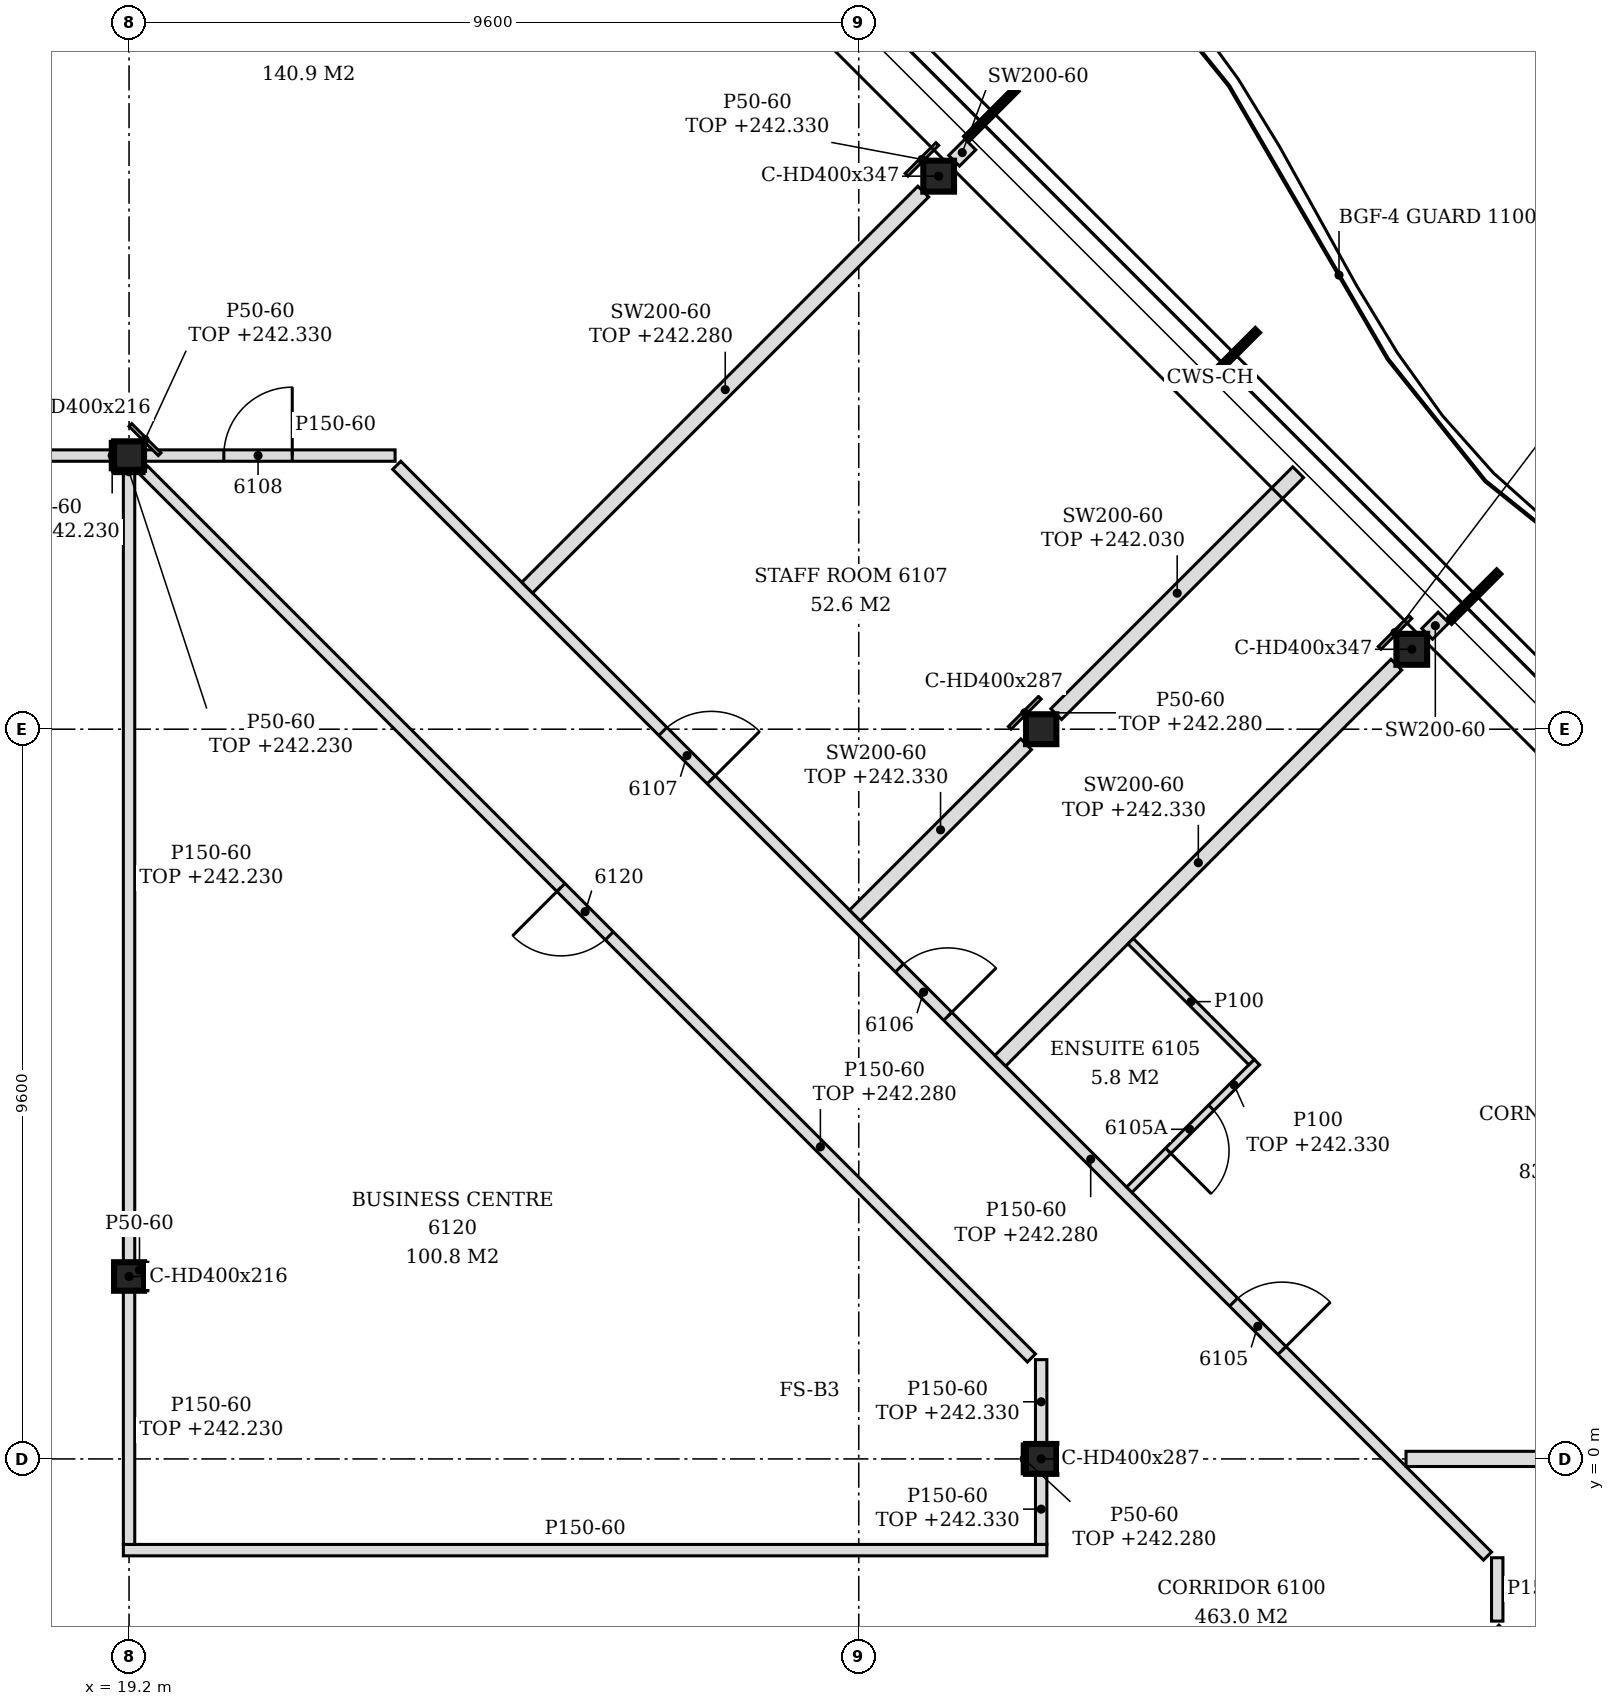
"""IFC4 building model, lengths in metres.
Left out: names, types, materials, properties, quantities, classifications, styles, units other than length and angle.
Written with IfcOpenShell. Run it as: python <this file> out.ifc"""

import sys

from ifc_helpers import new_model, si_unit, direction, frame, frame_2d, origin, origin_2d, place, context, subcontext, project, spatial, polyline, rectangle, i_section, outline, extrude, element, fill, save


model = new_model("IFC4")
c1 = context("Model", 3, precision=1e-05, world=origin(), true_north=direction((0.0, 1.0)))
c2 = subcontext(c1, "Body", "Model", "MODEL_VIEW")
j1 = project(units=[si_unit("LENGTHUNIT", "METRE"), si_unit("PLANEANGLEUNIT", "RADIAN")], contexts=[c1])
p1 = place(None, origin())
s1 = spatial("IfcSite", under=j1, at=p1, CompositionType="ELEMENT")
p2 = place(p1, origin())
s2 = spatial("IfcBuilding", under=s1, at=p2, CompositionType="ELEMENT")
p3 = place(p2, frame((0.0, 0.0, 239.4)))
s3 = spatial("IfcBuildingStorey", under=s2, at=p3, CompositionType="ELEMENT", Elevation=239.4)
for number, where, z_axis, x_axis in (
    (1, (36.076, 10.652, -0.15), (0.0, 0.0, 1.0), (1.0, 0.0, 0.0)),
    (2, (29.852, 16.876, -0.15), (0.0, 0.0, 1.0), (1.0, 0.0, 0.0)),
):
    element("IfcColumn", number, at=place(p3, frame(where, z_axis=z_axis, x_axis=x_axis)), inside=s3, PredefinedType="COLUMN", context=c2, shape_type="SweptSolid", body=[
        extrude(i_section(OverallWidth=0.404, OverallDepth=0.407, WebThickness=0.027, FlangeThickness=0.044, FilletRadius=0.015, at=origin_2d()), origin(), (0.0, 0.0, 1.0), 3.6),
    ])
for number, where, z_axis, x_axis in (
    (3, (19.2, 2.4, -0.15), (0.0, 0.0, 1.0), (1.0, 0.0, 0.0)),
    (4, (19.2, 13.2, -0.15), (0.0, 0.0, 1.0), (1.0, 0.0, 0.0)),
):
    element("IfcColumn", number, at=place(p3, frame(where, z_axis=z_axis, x_axis=x_axis)), inside=s3, PredefinedType="COLUMN", context=c2, shape_type="SweptSolid", body=[
        extrude(i_section(OverallWidth=0.394, OverallDepth=0.375, WebThickness=0.017, FlangeThickness=0.028, FilletRadius=0.015, at=origin_2d()), origin(), (0.0, 0.0, 1.0), 3.6),
    ])
for number, where, z_axis, x_axis in (
    (5, (31.2, 0.0, -0.15), (0.0, 0.0, 1.0), (1.0, 0.0, 0.0)),
    (6, (31.2, 9.6, -0.15), (0.0, 0.0, 1.0), (1.0, 0.0, 0.0)),
):
    element("IfcColumn", number, at=place(p3, frame(where, z_axis=z_axis, x_axis=x_axis)), inside=s3, PredefinedType="COLUMN", context=c2, shape_type="SweptSolid", body=[
        extrude(i_section(OverallWidth=0.399, OverallDepth=0.393, WebThickness=0.023, FlangeThickness=0.037, FilletRadius=0.015, at=origin_2d()), origin(), (0.0, 0.0, 1.0), 3.6),
    ])
p4 = place(p3, frame((35.503, -4.012, 0.0), z_axis=(0.0, 0.0, 1.0), x_axis=(0.707106781187, 0.707106781187, 0.0)))
e7 = element("IfcWall", 7, at=p4, inside=s3, PredefinedType="PARTITIONING", context=c2, shape_type="SweptSolid", body=[
    extrude(rectangle(XDim=2.506, YDim=0.15, at=frame_2d((1.253, 0.0))), origin(), (0.0, 0.0, 1.0), 3.45),
])
p5 = place(p3, frame((37.2, -2.134, 0.0), z_axis=(0.0, 0.0, 1.0), x_axis=(0.0, 1.0, 0.0)))
e8 = element("IfcWall", 8, at=p5, inside=s3, PredefinedType="PARTITIONING", context=c2, shape_type="SweptSolid", body=[
    extrude(rectangle(XDim=0.834, YDim=0.15, at=frame_2d((0.417, 0.0))), origin(), (0.0, 0.0, 1.0), 3.45),
])
p6 = place(p3, frame((37.072, -1.278, 0.0), z_axis=(0.0, 0.0, 1.0), x_axis=(-0.707106781187, 0.707106781187, 0.0)))
e9 = element("IfcWall", 9, at=p6, inside=s3, PredefinedType="PARTITIONING", context=c2, shape_type="SweptSolid", body=[
    extrude(rectangle(XDim=20.294, YDim=0.15, at=frame_2d((10.147, 0.0))), origin(), (0.0, 0.0, 1.0), 2.88),
])
p7 = place(p6, frame((3.824, 0.0, 0.0)))
e10 = element("IfcOpeningElement", 10, at=p7, cuts=e9, PredefinedType="OPENING", context=c2, shape_type="SweptSolid", body=[
    extrude(rectangle(XDim=0.9, YDim=2.1, at=frame_2d((0.45, 1.05))), frame((0.0, 0.085, 0.0), z_axis=(0.0, -1.0, 0.0), x_axis=(1.0, 0.0, 0.0)), (0.0, 0.0, 1.0), 0.17),
])
p8 = place(p6, frame((10.042, 0.0, 0.0)))
e11 = element("IfcOpeningElement", 11, at=p8, cuts=e9, PredefinedType="OPENING", context=c2, shape_type="SweptSolid", body=[
    extrude(rectangle(XDim=0.9, YDim=2.1, at=frame_2d((0.45, 1.05))), frame((0.0, 0.085, 0.0), z_axis=(0.0, -1.0, 0.0), x_axis=(1.0, 0.0, 0.0)), (0.0, 0.0, 1.0), 0.17),
])
p9 = place(p6, frame((14.443, 0.0, 0.0)))
e12 = element("IfcOpeningElement", 12, at=p9, cuts=e9, PredefinedType="OPENING", context=c2, shape_type="SweptSolid", body=[
    extrude(rectangle(XDim=0.9, YDim=2.1, at=frame_2d((0.45, 1.05))), frame((0.0, 0.085, 0.0), z_axis=(0.0, -1.0, 0.0), x_axis=(1.0, 0.0, 0.0)), (0.0, 0.0, 1.0), 0.17),
])
p10 = place(p3, frame((19.125, -1.2, 0.0), z_axis=(0.0, 0.0, 1.0), x_axis=(1.0, 0.0, 0.0)))
e13 = element("IfcWall", 13, at=p10, inside=s3, PredefinedType="PARTITIONING", context=c2, shape_type="SweptSolid", body=[
    extrude(outline(polyline([(0.0, 0.0), (12.15, 0.0), (12.15, 2.93), (11.925, 2.93), (11.923, 3.45), (0.225, 3.45), (0.223, 2.83), (0.0, 2.83), (0.0, 0.0)])), frame((0.0, 0.075, 0.0), z_axis=(0.0, -1.0, 0.0), x_axis=(1.0, 0.0, 0.0)), (0.0, 0.0, 1.0), 0.15),
])
p11 = place(p3, frame((19.2, -1.125, 0.0), z_axis=(0.0, 0.0, 1.0), x_axis=(0.0, 1.0, 0.0)))
e14 = element("IfcWall", 14, at=p11, inside=s3, PredefinedType="PARTITIONING", context=c2, shape_type="SweptSolid", body=[
    extrude(rectangle(XDim=3.337, YDim=0.15, at=frame_2d((1.669, 0.0))), origin(), (0.0, 0.0, 1.0), 2.83),
])
p12 = place(p3, frame((31.2, -1.125, 0.0), z_axis=(0.0, 0.0, 1.0), x_axis=(0.0, 1.0, 0.0)))
e15 = element("IfcWall", 15, at=p12, inside=s3, PredefinedType="PARTITIONING", context=c2, shape_type="SweptSolid", body=[
    extrude(rectangle(XDim=0.928, YDim=0.15, at=frame_2d((0.464, 0.0))), origin(), (0.0, 0.0, 1.0), 2.93),
])
p13 = place(p3, frame((36.0, 0.0, 0.0), z_axis=(0.0, 0.0, 1.0), x_axis=(1.0, 0.0, 0.0)))
e16 = element("IfcWall", 16, at=p13, inside=s3, PredefinedType="PARTITIONING", context=c2, shape_type="SweptSolid", body=[
    extrude(rectangle(XDim=6.85, YDim=0.2, at=frame_2d((3.425, 0.0))), origin(), (0.0, 0.0, 1.0), 2.88),
])
p14 = place(p3, frame((31.2, 0.197, 0.0), z_axis=(0.0, 0.0, 1.0), x_axis=(0.0, 1.0, 0.0)))
e17 = element("IfcWall", 17, at=p14, inside=s3, PredefinedType="PARTITIONING", context=c2, shape_type="SweptSolid", body=[
    extrude(rectangle(XDim=1.11, YDim=0.15, at=frame_2d((0.555, 0.0))), origin(), (0.0, 0.0, 1.0), 2.93),
])
p15 = place(p3, frame((31.072, 1.328, 0.0), z_axis=(0.0, 0.0, 1.0), x_axis=(-0.707099390895, 0.707114171401, 0.0)))
e18 = element("IfcWall", 18, at=p15, inside=s3, PredefinedType="PARTITIONING", context=c2, shape_type="SweptSolid", body=[
    extrude(rectangle(XDim=16.518, YDim=0.15, at=frame_2d((8.259, 0.0))), origin(), (0.0, 0.0, 1.0), 2.88),
])
p16 = place(p15, frame((7.854, 0.0, 0.0)))
e19 = element("IfcOpeningElement", 19, at=p16, cuts=e18, PredefinedType="OPENING", context=c2, shape_type="SweptSolid", body=[
    extrude(rectangle(XDim=0.9, YDim=2.1, at=frame_2d((0.45, 1.05))), frame((0.0, 0.085, 0.0), z_axis=(0.0, -1.0, 0.0), x_axis=(1.0, 0.0, 0.0)), (0.0, 0.0, 1.0), 0.17),
])
p17 = place(p3, frame((19.2, 2.587, 0.0), z_axis=(0.0, 0.0, 1.0), x_axis=(0.0, 1.0, 0.0)))
e20 = element("IfcWall", 20, at=p17, inside=s3, PredefinedType="PARTITIONING", context=c2, shape_type="SweptSolid", body=[
    extrude(rectangle(XDim=10.425, YDim=0.15, at=frame_2d((5.212, 0.0))), origin(), (0.0, 0.0, 1.0), 2.83),
])
p18 = place(p3, frame((32.359, 3.541, 0.0), z_axis=(0.0, 0.0, 1.0), x_axis=(0.707158179099, 0.707055379538, 0.0)))
e21 = element("IfcWall", 21, at=p18, inside=s3, PredefinedType="PARTITIONING", context=c2, shape_type="SweptSolid", body=[
    extrude(rectangle(XDim=2.375, YDim=0.1, at=frame_2d((1.188, 0.0))), origin(), (0.0, 0.0, 1.0), 2.93),
])
p19 = place(p18, frame((0.725, 0.0, 0.0)))
e22 = element("IfcOpeningElement", 22, at=p19, cuts=e21, PredefinedType="OPENING", context=c2, shape_type="SweptSolid", body=[
    extrude(rectangle(XDim=0.8, YDim=2.1, at=frame_2d((0.4, 1.05))), frame((0.0, 0.06, 0.0), z_axis=(0.0, -1.0, 0.0), x_axis=(1.0, 0.0, 0.0)), (0.0, 0.0, 1.0), 0.12),
])
p20 = place(p3, frame((30.662, 5.238, 0.0), z_axis=(0.0, 0.0, 1.0), x_axis=(0.707106781187, 0.707106781187, 0.0)))
e23 = element("IfcWall", 23, at=p20, inside=s3, PredefinedType="PARTITIONING", context=c2, shape_type="SweptSolid", body=[
    extrude(rectangle(XDim=7.369, YDim=0.2, at=frame_2d((3.685, 0.0))), origin(), (0.0, 0.0, 1.0), 2.93),
])
p21 = place(p3, frame((33.968, 5.22, 0.0), z_axis=(0.0, 0.0, 1.0), x_axis=(-0.707106781187, 0.707106781187, 0.0)))
e24 = element("IfcWall", 24, at=p21, inside=s3, PredefinedType="PARTITIONING", context=c2, shape_type="SweptSolid", body=[
    extrude(rectangle(XDim=2.25, YDim=0.1, at=frame_2d((1.125, 0.0))), origin(), (0.0, 0.0, 1.0), 3.45),
])
p22 = place(p3, frame((28.75, 7.15, 0.0), z_axis=(0.0, 0.0, 1.0), x_axis=(0.7070684525, 0.707145107796, 0.0)))
e25 = element("IfcWall", 25, at=p22, inside=s3, PredefinedType="PARTITIONING", context=c2, shape_type="SweptSolid", body=[
    extrude(rectangle(XDim=3.185, YDim=0.2, at=frame_2d((1.592, 0.0))), origin(), (0.0, 0.0, 1.0), 2.93),
])
p23 = place(p3, frame((31.398, 9.798, 0.0), z_axis=(0.0, 0.0, 1.0), x_axis=(0.707133900936, 0.707079660397, 0.0)))
e26 = element("IfcWall", 26, at=p23, inside=s3, PredefinedType="PARTITIONING", context=c2, shape_type="SweptSolid", body=[
    extrude(rectangle(XDim=4.501, YDim=0.2, at=frame_2d((2.25, 0.0))), origin(), (0.0, 0.0, 1.0), 2.63),
])
p24 = place(p3, frame((36.278, 10.854, 0.0), z_axis=(0.0, 0.0, 1.0), x_axis=(0.707509117806, 0.706704215511, 0.0)))
e27 = element("IfcWall", 27, at=p24, inside=s3, PredefinedType="PARTITIONING", context=c2, shape_type="SweptSolid", body=[
    extrude(rectangle(XDim=0.303, YDim=0.2, at=frame_2d((0.152, 0.0))), origin(), (0.0, 0.0, 1.0), 3.45),
])
p25 = place(p3, frame((24.438, 11.462, 0.0), z_axis=(0.0, 0.0, 1.0), x_axis=(0.707090216072, 0.707123345913, 0.0)))
e28 = element("IfcWall", 28, at=p25, inside=s3, PredefinedType="PARTITIONING", context=c2, shape_type="SweptSolid", body=[
    extrude(rectangle(XDim=7.369, YDim=0.2, at=frame_2d((3.685, 0.0))), origin(), (0.0, 0.0, 1.0), 2.88),
])
p26 = place(p3, frame((7.397, 13.2, 0.0), z_axis=(0.0, 0.0, 1.0), x_axis=(1.0, 0.0, 0.0)))
e29 = element("IfcWall", 29, at=p26, inside=s3, PredefinedType="PARTITIONING", context=c2, shape_type="SweptSolid", body=[
    extrude(rectangle(XDim=11.606, YDim=0.15, at=frame_2d((5.803, 0.0))), origin(), (0.0, 0.0, 1.0), 2.83),
])
p27 = place(p26, frame((3.227, 0.0, 0.0)))
e30 = element("IfcOpeningElement", 30, at=p27, cuts=e29, PredefinedType="OPENING", context=c2, shape_type="SweptSolid", body=[
    extrude(rectangle(XDim=1.8, YDim=2.1, at=frame_2d((0.9, 1.05))), frame((0.0, 0.085, 0.0), z_axis=(0.0, -1.0, 0.0), x_axis=(1.0, 0.0, 0.0)), (0.0, 0.0, 1.0), 0.17),
])
p28 = place(p3, frame((19.397, 13.2, 0.0), z_axis=(0.0, 0.0, 1.0), x_axis=(1.0, 0.0, 0.0)))
e31 = element("IfcWall", 31, at=p28, inside=s3, PredefinedType="PARTITIONING", context=c2, shape_type="SweptSolid", body=[
    extrude(rectangle(XDim=3.303, YDim=0.15, at=frame_2d((1.652, 0.0))), origin(), (0.0, 0.0, 1.0), 3.45),
])
p29 = place(p28, frame((1.05, 0.0, 0.0)))
e32 = element("IfcOpeningElement", 32, at=p29, cuts=e31, PredefinedType="OPENING", context=c2, shape_type="SweptSolid", body=[
    extrude(rectangle(XDim=0.9, YDim=2.1, at=frame_2d((0.45, 1.05))), frame((0.0, 0.085, 0.0), z_axis=(0.0, -1.0, 0.0), x_axis=(1.0, 0.0, 0.0)), (0.0, 0.0, 1.0), 0.17),
])
p30 = place(p3, frame((30.054, 17.078, 0.0), z_axis=(0.0, 0.0, 1.0), x_axis=(0.707106781187, 0.707106781187, 0.0)))
e33 = element("IfcWall", 33, at=p30, inside=s3, PredefinedType="PARTITIONING", context=c2, shape_type="SweptSolid", body=[
    extrude(rectangle(XDim=0.303, YDim=0.2, at=frame_2d((0.152, 0.0))), origin(), (0.0, 0.0, 1.0), 3.45),
])
p31 = place(p3, frame((19.422, 2.212, 0.0), z_axis=(0.0, 0.0, 1.0), x_axis=(0.0, 1.0, 0.0)))
e34 = element("IfcWall", 34, at=p31, inside=s3, PredefinedType="PARTITIONING", context=c2, shape_type="SweptSolid", body=[
    extrude(rectangle(XDim=0.375, YDim=0.05, at=frame_2d((0.188, 0.0))), origin(), (0.0, 0.0, 1.0), 3.45),
])
p32 = place(p3, frame((18.978, 13.012, 0.0), z_axis=(0.0, 0.0, 1.0), x_axis=(0.0, 1.0, 0.0)))
e35 = element("IfcWall", 35, at=p32, inside=s3, PredefinedType="PARTITIONING", context=c2, shape_type="SweptSolid", body=[
    extrude(rectangle(XDim=0.375, YDim=0.05, at=frame_2d((0.188, 0.0))), origin(), (0.0, 0.0, 1.0), 2.83),
])
p33 = place(p3, frame((30.976, -0.197, 0.0), z_axis=(0.0, 0.0, 1.0), x_axis=(0.0, 1.0, 0.0)))
e36 = element("IfcWall", 36, at=p33, inside=s3, PredefinedType="PARTITIONING", context=c2, shape_type="SweptSolid", body=[
    extrude(rectangle(XDim=0.393, YDim=0.05, at=frame_2d((0.197, 0.0))), origin(), (0.0, 0.0, 1.0), 2.88),
])
p34 = place(p3, frame((19.602, 13.218, 0.0), z_axis=(0.0, 0.0, 1.0), x_axis=(-0.707106781187, 0.707106781187, 0.0)))
e37 = element("IfcWall", 37, at=p34, inside=s3, PredefinedType="PARTITIONING", context=c2, shape_type="SweptSolid", body=[
    extrude(rectangle(XDim=0.544, YDim=0.05, at=frame_2d((0.272, 0.0))), origin(), (0.0, 0.0, 1.0), 2.93),
])
p35 = place(p3, frame((35.653, 10.669, 0.0), z_axis=(0.0, 0.0, 1.0), x_axis=(0.707106781187, 0.707106781187, 0.0)))
e38 = element("IfcWall", 38, at=p35, inside=s3, PredefinedType="PARTITIONING", context=c2, shape_type="SweptSolid", body=[
    extrude(rectangle(XDim=0.573, YDim=0.05, at=frame_2d((0.287, 0.0))), origin(), (0.0, 0.0, 1.0), 2.63),
])
p36 = place(p3, frame((30.786, 9.618, 0.0), z_axis=(0.0, 0.0, 1.0), x_axis=(0.707106781187, 0.707106781187, 0.0)))
e39 = element("IfcWall", 39, at=p36, inside=s3, PredefinedType="PARTITIONING", context=c2, shape_type="SweptSolid", body=[
    extrude(rectangle(XDim=0.56, YDim=0.05, at=frame_2d((0.28, 0.0))), origin(), (0.0, 0.0, 1.0), 2.88),
])
p37 = place(p3, frame((29.428, 16.893, 0.0), z_axis=(0.0, 0.0, 1.0), x_axis=(0.707106781187, 0.707106781187, 0.0)))
e40 = element("IfcWall", 40, at=p37, inside=s3, PredefinedType="PARTITIONING", context=c2, shape_type="SweptSolid", body=[
    extrude(rectangle(XDim=0.573, YDim=0.05, at=frame_2d((0.287, 0.0))), origin(), (0.0, 0.0, 1.0), 2.93),
])
p38 = place(p3, frame((19.003, 12.988, 0.0), z_axis=(0.0, 0.0, 1.0), x_axis=(1.0, 0.0, 0.0)))
e41 = element("IfcWall", 41, at=p38, inside=s3, PredefinedType="PARTITIONING", context=c2, shape_type="SweptSolid", body=[
    extrude(rectangle(XDim=0.394, YDim=0.05, at=frame_2d((0.197, 0.0))), origin(), (0.0, 0.0, 1.0), 2.83),
])
p39 = place(p7, frame((0.9, 0.0, 0.0), z_axis=(0.0, 0.0, 1.0), x_axis=(-1.0, 0.0, 0.0)))
e42 = element("IfcDoor", 42, at=p39, inside=s3, OperationType="SINGLE_SWING_RIGHT", PredefinedType="DOOR", context=c2, shape_type="SweptSolid", body=[
    extrude(rectangle(XDim=0.9, YDim=2.1, at=frame_2d((0.45, 1.05))), frame((0.0, 0.025, 0.0), z_axis=(0.0, -1.0, 0.0), x_axis=(1.0, 0.0, 0.0)), (0.0, 0.0, 1.0), 0.05),
])
fill(e10, e42)
p40 = place(p19, frame((0.8, 0.0, 0.0), z_axis=(0.0, 0.0, 1.0), x_axis=(-1.0, 0.0, 0.0)))
e43 = element("IfcDoor", 43, at=p40, inside=s3, OperationType="SINGLE_SWING_RIGHT", PredefinedType="DOOR", context=c2, shape_type="SweptSolid", body=[
    extrude(rectangle(XDim=0.8, YDim=2.1, at=frame_2d((0.4, 1.05))), frame((0.0, 0.025, 0.0), z_axis=(0.0, -1.0, 0.0), x_axis=(1.0, 0.0, 0.0)), (0.0, 0.0, 1.0), 0.05),
])
fill(e22, e43)
p41 = place(p8, frame((0.9, 0.0, 0.0), z_axis=(0.0, 0.0, 1.0), x_axis=(-1.0, 0.0, 0.0)))
e44 = element("IfcDoor", 44, at=p41, inside=s3, OperationType="SINGLE_SWING_RIGHT", PredefinedType="DOOR", context=c2, shape_type="SweptSolid", body=[
    extrude(rectangle(XDim=0.9, YDim=2.1, at=frame_2d((0.45, 1.05))), frame((0.0, 0.025, 0.0), z_axis=(0.0, -1.0, 0.0), x_axis=(1.0, 0.0, 0.0)), (0.0, 0.0, 1.0), 0.05),
])
fill(e11, e44)
p42 = place(p9, frame((0.9, 0.0, 0.0), z_axis=(0.0, 0.0, 1.0), x_axis=(-1.0, 0.0, 0.0)))
e45 = element("IfcDoor", 45, at=p42, inside=s3, OperationType="SINGLE_SWING_RIGHT", PredefinedType="DOOR", context=c2, shape_type="SweptSolid", body=[
    extrude(rectangle(XDim=0.9, YDim=2.1, at=frame_2d((0.45, 1.05))), frame((0.0, 0.025, 0.0), z_axis=(0.0, -1.0, 0.0), x_axis=(1.0, 0.0, 0.0)), (0.0, 0.0, 1.0), 0.05),
])
fill(e12, e45)
p43 = place(p29, origin())
e46 = element("IfcDoor", 46, at=p43, inside=s3, OperationType="SINGLE_SWING_RIGHT", PredefinedType="DOOR", context=c2, shape_type="SweptSolid", body=[
    extrude(rectangle(XDim=0.9, YDim=2.1, at=frame_2d((0.45, 1.05))), frame((0.0, 0.025, 0.0), z_axis=(0.0, -1.0, 0.0), x_axis=(1.0, 0.0, 0.0)), (0.0, 0.0, 1.0), 0.05),
])
fill(e32, e46)
p44 = place(p16, origin())
e47 = element("IfcDoor", 47, at=p44, inside=s3, OperationType="SINGLE_SWING_RIGHT", PredefinedType="DOOR", context=c2, shape_type="SweptSolid", body=[
    extrude(rectangle(XDim=0.9, YDim=2.1, at=frame_2d((0.45, 1.05))), frame((0.0, 0.025, 0.0), z_axis=(0.0, -1.0, 0.0), x_axis=(1.0, 0.0, 0.0)), (0.0, 0.0, 1.0), 0.05),
])
fill(e19, e47)
save(model, sys.argv[1])
